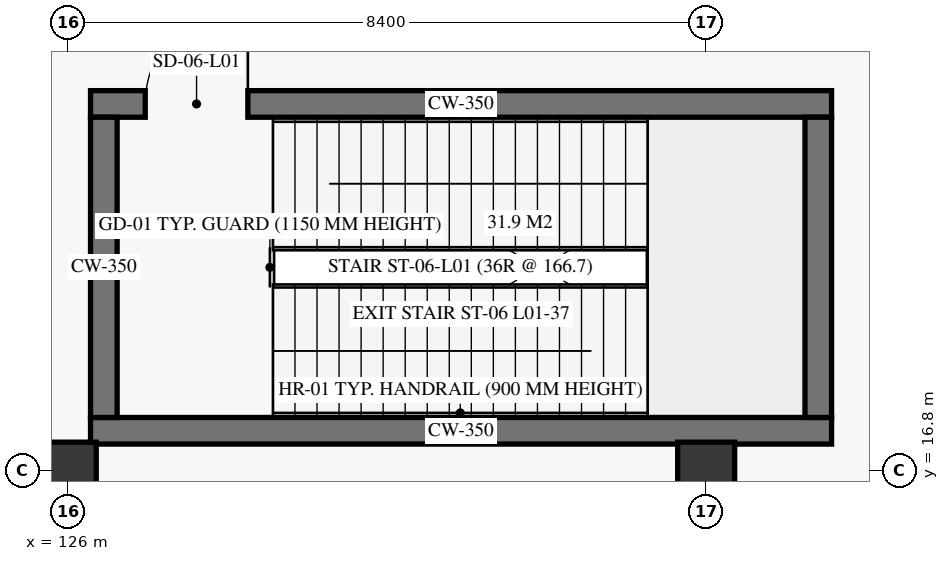
"""IFC4 building model, lengths in metres.
Left out: names, types, materials, properties, quantities, classifications, styles, units other than length and angle.
Written with IfcOpenShell. Run it as: python <this file> out.ifc"""

import sys

from ifc_helpers import new_model, si_unit, direction, frame, frame_2d, origin, origin_2d, place, context, subcontext, project, spatial, rectangle, extrude, element, fill, save


model = new_model("IFC4")
c1 = context("Model", 3, precision=1e-05, world=origin(), true_north=direction((0.0, 1.0)))
c2 = subcontext(c1, "Body", "Model", "MODEL_VIEW")
j1 = project(units=[si_unit("LENGTHUNIT", "METRE"), si_unit("PLANEANGLEUNIT", "RADIAN")], contexts=[c1])
p1 = place(None, origin())
s1 = spatial("IfcSite", under=j1, at=p1, CompositionType="ELEMENT")
p2 = place(p1, origin())
s2 = spatial("IfcBuilding", under=s1, at=p2, CompositionType="ELEMENT")
p3 = place(p2, origin())
s3 = spatial("IfcBuildingStorey", under=s2, at=p3, CompositionType="ELEMENT", Elevation=0.0)
for number, where, z_axis, x_axis in (
    (1, (126.0, 16.8, 0.0), (0.0, 0.0, 1.0), (1.0, 0.0, 0.0)),
    (2, (134.4, 16.8, 0.0), (0.0, 0.0, 1.0), (1.0, 0.0, 0.0)),
):
    element("IfcColumn", number, at=place(p3, frame(where, z_axis=z_axis, x_axis=x_axis)), inside=s3, PredefinedType="COLUMN", context=c2, shape_type="SweptSolid", body=[
        extrude(rectangle(XDim=0.75, YDim=0.75, at=origin_2d()), origin(), (0.0, 0.0, 1.0), 5.7),
    ])
p4 = place(p3, frame((126.3, 17.325, 0.0), z_axis=(0.0, 0.0, 1.0), x_axis=(1.0, 0.0, 0.0)))
e3 = element("IfcWall", 3, at=p4, inside=s3, PredefinedType="SHEAR", context=c2, shape_type="SweptSolid", body=[
    extrude(rectangle(XDim=9.75, YDim=0.35, at=frame_2d((4.875, 0.0))), origin(), (0.0, 0.0, 1.0), 5.7),
])
p5 = place(p3, frame((126.3, 21.625, 0.0), z_axis=(0.0, 0.0, 1.0), x_axis=(1.0, 0.0, 0.0)))
e4 = element("IfcWall", 4, at=p5, inside=s3, PredefinedType="SHEAR", context=c2, shape_type="SweptSolid", body=[
    extrude(rectangle(XDim=9.75, YDim=0.35, at=frame_2d((4.875, 0.0))), origin(), (0.0, 0.0, 1.0), 5.7),
])
p6 = place(p5, frame((0.72, 0.0, 0.0)))
e5 = element("IfcOpeningElement", 5, at=p6, cuts=e4, PredefinedType="OPENING", context=c2, shape_type="SweptSolid", body=[
    extrude(rectangle(XDim=1.35, YDim=2.25, at=frame_2d((0.675, 1.125))), frame((0.0, 0.185, 0.0), z_axis=(0.0, -1.0, 0.0), x_axis=(1.0, 0.0, 0.0)), (0.0, 0.0, 1.0), 0.37),
])
for number, where, z_axis, x_axis in (
    (6, (126.475, 17.5, 0.0), (0.0, 0.0, 1.0), (0.0, 1.0, 0.0)),
    (7, (135.875, 17.5, 0.0), (0.0, 0.0, 1.0), (0.0, 1.0, 0.0)),
):
    element("IfcWall", number, at=place(p3, frame(where, z_axis=z_axis, x_axis=x_axis)), inside=s3, PredefinedType="SHEAR", context=c2, shape_type="SweptSolid", body=[
        extrude(rectangle(XDim=3.95, YDim=0.35, at=frame_2d((1.975, 0.0))), origin(), (0.0, 0.0, 1.0), 5.7),
    ])
p7 = place(p6, origin())
e8 = element("IfcDoor", 8, at=p7, inside=s3, OperationType="SINGLE_SWING_RIGHT", PredefinedType="DOOR", context=c2, shape_type="SweptSolid", body=[
    extrude(rectangle(XDim=1.35, YDim=2.25, at=frame_2d((0.675, 1.125))), frame((0.0, 0.025, 0.0), z_axis=(0.0, -1.0, 0.0), x_axis=(1.0, 0.0, 0.0)), (0.0, 0.0, 1.0), 0.05),
])
fill(e5, e8)
save(model, sys.argv[1])
